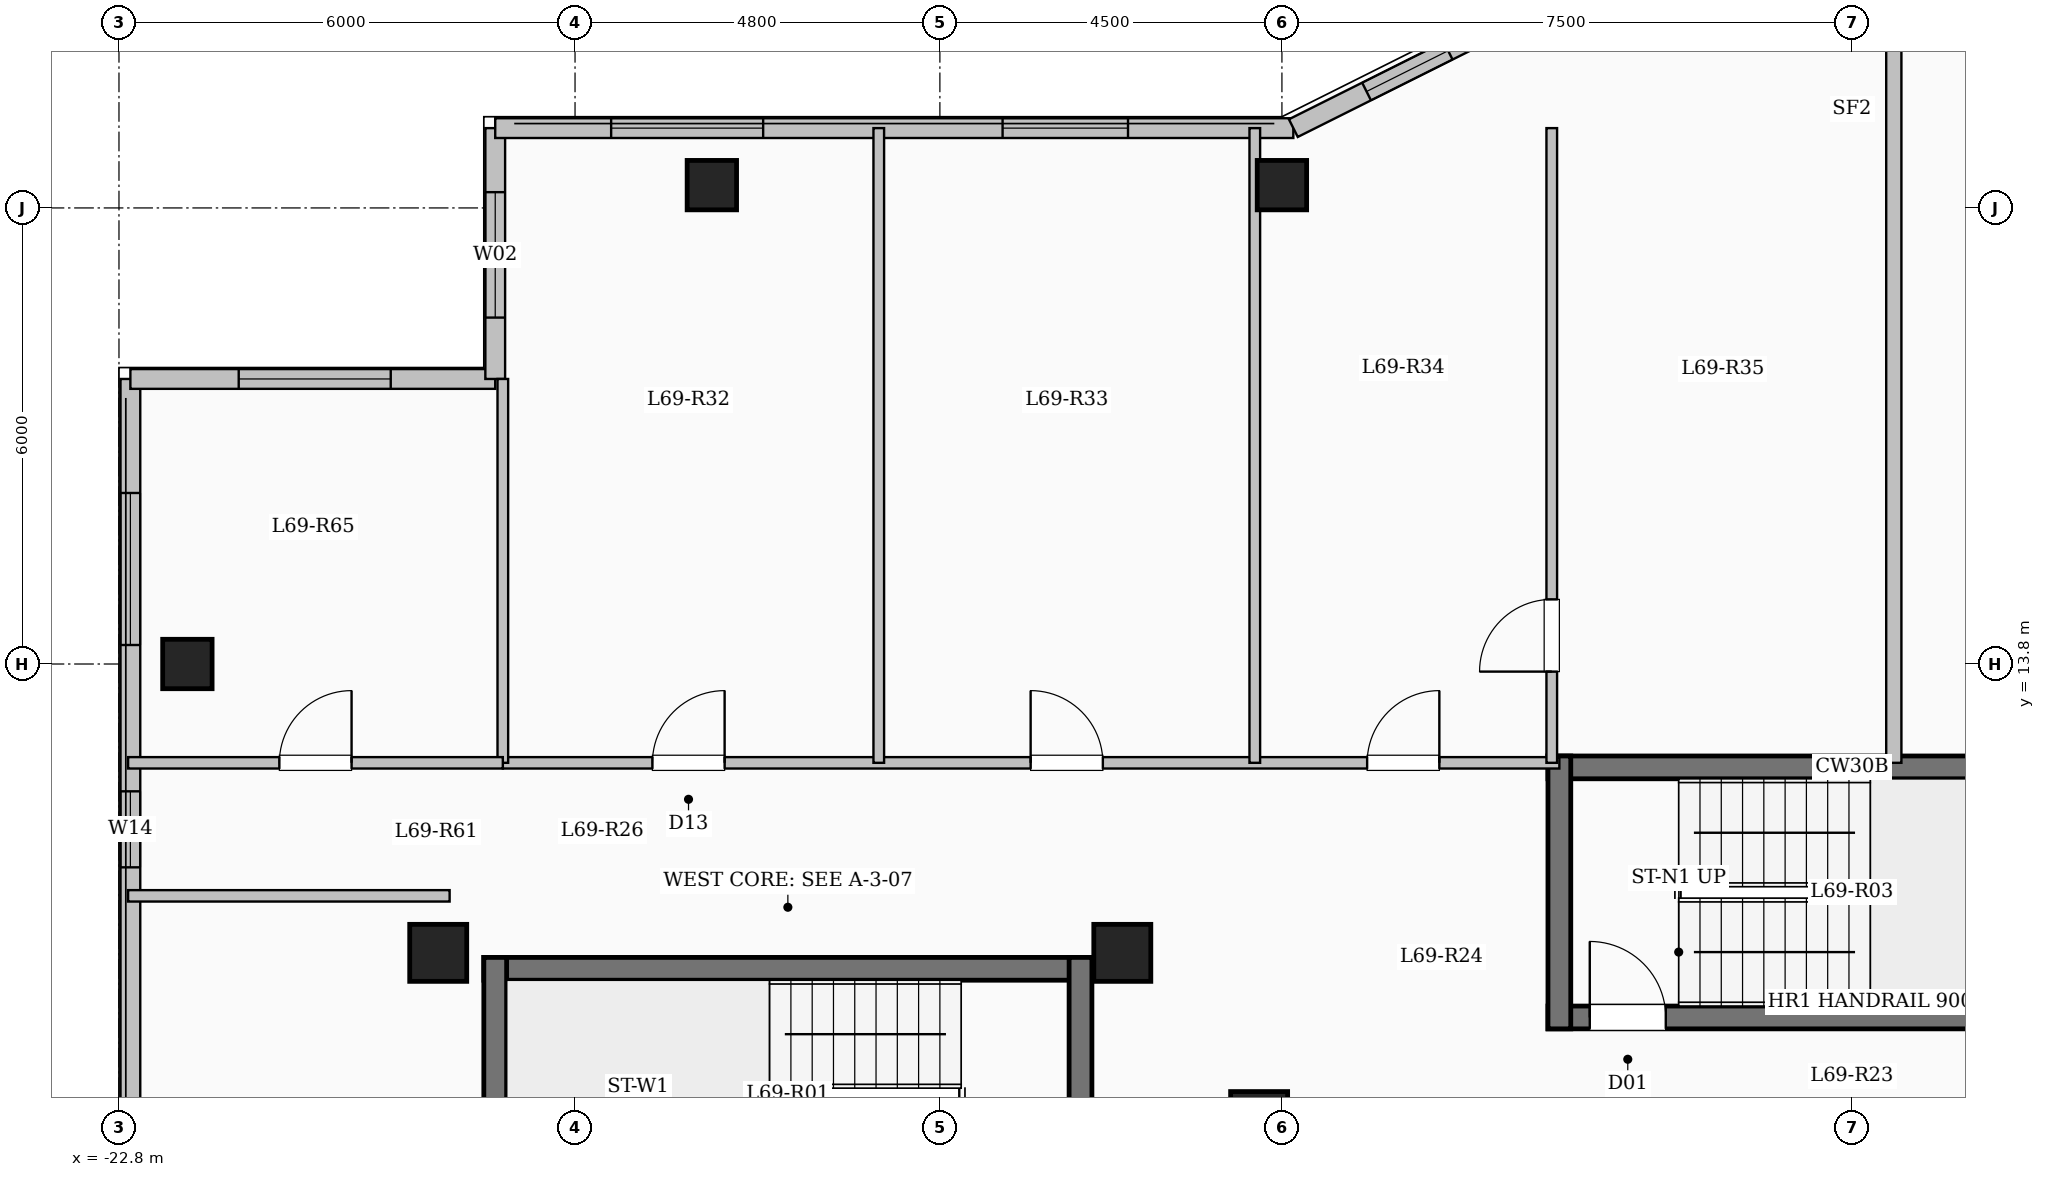
"""IFC4 building model, lengths in metres.
Left out: names, types, materials, properties, quantities, classifications, styles, units other than length and angle.
Written with IfcOpenShell. Run it as: python <this file> out.ifc"""

import sys

from ifc_helpers import new_model, si_unit, direction, frame, frame_2d, origin, origin_2d, place, context, subcontext, project, spatial, rectangle, extrude, element, fill, save


model = new_model("IFC4")
c1 = context("Model", 3, precision=1e-05, world=origin(), true_north=direction((0.0, 1.0)))
c2 = subcontext(c1, "Body", "Model", "MODEL_VIEW")
j1 = project(units=[si_unit("LENGTHUNIT", "METRE"), si_unit("PLANEANGLEUNIT", "RADIAN")], contexts=[c1])
p1 = place(None, origin())
s1 = spatial("IfcSite", under=j1, at=p1, CompositionType="ELEMENT")
p2 = place(p1, origin())
s2 = spatial("IfcBuilding", under=s1, at=p2, CompositionType="ELEMENT")
p3 = place(p2, frame((0.0, 0.0, 254.9)))
s3 = spatial("IfcBuildingStorey", under=s2, at=p3, CompositionType="ELEMENT", Elevation=254.9)
for number, where, z_axis, x_axis in (
    (1, (-7.8, 7.8, 0.0), (0.0, 0.0, 1.0), (1.0, 0.0, 0.0)),
    (2, (-9.6, 10.0, 0.0), (0.0, 0.0, 1.0), (1.0, 0.0, 0.0)),
    (3, (-18.6, 10.0, 0.0), (0.0, 0.0, 1.0), (1.0, 0.0, 0.0)),
):
    element("IfcColumn", number, at=place(p3, frame(where, z_axis=z_axis, x_axis=x_axis)), inside=s3, PredefinedType="COLUMN", context=c2, shape_type="SweptSolid", body=[
        extrude(rectangle(XDim=0.75, YDim=0.75, at=origin_2d()), origin(), (0.0, 0.0, 1.0), 3.35),
    ])
for number, where, z_axis, x_axis in (
    (4, (-15.0, 20.1, 0.0), (0.0, 0.0, 1.0), (1.0, 0.0, 0.0)),
    (5, (-7.5, 20.1, 0.0), (0.0, 0.0, 1.0), (1.0, 0.0, 0.0)),
    (6, (-21.9, 13.8, 0.0), (0.0, 0.0, 1.0), (1.0, 0.0, 0.0)),
):
    element("IfcColumn", number, at=place(p3, frame(where, z_axis=z_axis, x_axis=x_axis)), inside=s3, PredefinedType="COLUMN", context=c2, shape_type="SweptSolid", body=[
        extrude(rectangle(XDim=0.65, YDim=0.65, at=origin_2d()), origin(), (0.0, 0.0, 1.0), 3.35),
    ])
p4 = place(p3, frame((-22.65, -17.55, 0.0), z_axis=(0.0, 0.0, 1.0), x_axis=(0.0, 1.0, 0.0)))
e7 = element("IfcWall", 7, at=p4, inside=s3, PredefinedType="SOLIDWALL", context=c2, shape_type="SweptSolid", body=[
    extrude(rectangle(XDim=35.1, YDim=0.26, at=frame_2d((17.55, 0.0))), origin(), (0.0, 0.0, 1.0), 3.1),
])
p5 = place(p4, frame((2.975, 0.0, 0.9)))
e8 = element("IfcOpeningElement", 8, at=p5, cuts=e7, PredefinedType="OPENING", context=c2, shape_type="SweptSolid", body=[
    extrude(rectangle(XDim=2.2, YDim=1.75, at=frame_2d((1.1, 0.875))), frame((0.0, 0.14, 0.0), z_axis=(0.0, -1.0, 0.0), x_axis=(1.0, 0.0, 0.0)), (0.0, 0.0, 1.0), 0.28),
])
p6 = place(p4, frame((8.625, 0.0, 0.95)))
e9 = element("IfcOpeningElement", 9, at=p6, cuts=e7, PredefinedType="OPENING", context=c2, shape_type="SweptSolid", body=[
    extrude(rectangle(XDim=1.2, YDim=1.5, at=frame_2d((0.6, 0.75))), frame((0.0, 0.14, 0.0), z_axis=(0.0, -1.0, 0.0), x_axis=(1.0, 0.0, 0.0)), (0.0, 0.0, 1.0), 0.28),
])
p7 = place(p4, frame((18.3, 0.0, 0.9)))
e10 = element("IfcOpeningElement", 10, at=p7, cuts=e7, PredefinedType="OPENING", context=c2, shape_type="SweptSolid", body=[
    extrude(rectangle(XDim=2.0, YDim=1.7, at=frame_2d((1.0, 0.85))), frame((0.0, 0.14, 0.0), z_axis=(0.0, -1.0, 0.0), x_axis=(1.0, 0.0, 0.0)), (0.0, 0.0, 1.0), 0.28),
])
p8 = place(p4, frame((28.675, 0.0, 0.95)))
e11 = element("IfcOpeningElement", 11, at=p8, cuts=e7, PredefinedType="OPENING", context=c2, shape_type="SweptSolid", body=[
    extrude(rectangle(XDim=1.0, YDim=1.5, at=frame_2d((0.5, 0.75))), frame((0.0, 0.14, 0.0), z_axis=(0.0, -1.0, 0.0), x_axis=(1.0, 0.0, 0.0)), (0.0, 0.0, 1.0), 0.28),
])
p9 = place(p4, frame((31.6, 0.0, 0.9)))
e12 = element("IfcOpeningElement", 12, at=p9, cuts=e7, PredefinedType="OPENING", context=c2, shape_type="SweptSolid", body=[
    extrude(rectangle(XDim=2.0, YDim=1.7, at=frame_2d((1.0, 0.85))), frame((0.0, 0.14, 0.0), z_axis=(0.0, -1.0, 0.0), x_axis=(1.0, 0.0, 0.0)), (0.0, 0.0, 1.0), 0.28),
])
p10 = place(p3, frame((-22.65, 17.55, 0.0), z_axis=(0.0, 0.0, 1.0), x_axis=(1.0, 0.0, 0.0)))
e13 = element("IfcWall", 13, at=p10, inside=s3, PredefinedType="SOLIDWALL", context=c2, shape_type="SweptSolid", body=[
    extrude(rectangle(XDim=4.8, YDim=0.26, at=frame_2d((2.4, 0.0))), origin(), (0.0, 0.0, 1.0), 3.1),
])
p11 = place(p10, frame((1.425, 0.0, 0.9)))
e14 = element("IfcOpeningElement", 14, at=p11, cuts=e13, PredefinedType="OPENING", context=c2, shape_type="SweptSolid", body=[
    extrude(rectangle(XDim=2.0, YDim=1.7, at=frame_2d((1.0, 0.85))), frame((0.0, 0.14, 0.0), z_axis=(0.0, -1.0, 0.0), x_axis=(1.0, 0.0, 0.0)), (0.0, 0.0, 1.0), 0.28),
])
p12 = place(p3, frame((-17.85, 17.55, 0.0), z_axis=(0.0, 0.0, 1.0), x_axis=(0.0, 1.0, 0.0)))
e15 = element("IfcWall", 15, at=p12, inside=s3, PredefinedType="SOLIDWALL", context=c2, shape_type="SweptSolid", body=[
    extrude(rectangle(XDim=3.3, YDim=0.26, at=frame_2d((1.65, 0.0))), origin(), (0.0, 0.0, 1.0), 3.1),
])
p13 = place(p12, frame((0.808, 0.0, 0.9)))
e16 = element("IfcOpeningElement", 16, at=p13, cuts=e15, PredefinedType="OPENING", context=c2, shape_type="SweptSolid", body=[
    extrude(rectangle(XDim=1.65, YDim=1.6, at=frame_2d((0.825, 0.8))), frame((0.0, 0.14, 0.0), z_axis=(0.0, -1.0, 0.0), x_axis=(1.0, 0.0, 0.0)), (0.0, 0.0, 1.0), 0.28),
])
p14 = place(p3, frame((-17.85, 20.85, 0.0), z_axis=(0.0, 0.0, 1.0), x_axis=(1.0, 0.0, 0.0)))
e17 = element("IfcWall", 17, at=p14, inside=s3, PredefinedType="SOLIDWALL", context=c2, shape_type="SweptSolid", body=[
    extrude(rectangle(XDim=10.5, YDim=0.26, at=frame_2d((5.25, 0.0))), origin(), (0.0, 0.0, 1.0), 3.1),
])
p15 = place(p14, frame((1.525, 0.0, 0.9)))
e18 = element("IfcOpeningElement", 18, at=p15, cuts=e17, PredefinedType="OPENING", context=c2, shape_type="SweptSolid", body=[
    extrude(rectangle(XDim=2.0, YDim=1.7, at=frame_2d((1.0, 0.85))), frame((0.0, 0.14, 0.0), z_axis=(0.0, -1.0, 0.0), x_axis=(1.0, 0.0, 0.0)), (0.0, 0.0, 1.0), 0.28),
])
p16 = place(p14, frame((6.675, 0.0, 0.9)))
e19 = element("IfcOpeningElement", 19, at=p16, cuts=e17, PredefinedType="OPENING", context=c2, shape_type="SweptSolid", body=[
    extrude(rectangle(XDim=1.65, YDim=1.6, at=frame_2d((0.825, 0.8))), frame((0.0, 0.14, 0.0), z_axis=(0.0, -1.0, 0.0), x_axis=(1.0, 0.0, 0.0)), (0.0, 0.0, 1.0), 0.28),
])
p17 = place(p3, frame((-7.35, 20.85, 0.0), z_axis=(0.0, 0.0, 1.0), x_axis=(0.894427191, 0.4472135955, 0.0)))
e20 = element("IfcWall", 20, at=p17, inside=s3, PredefinedType="SOLIDWALL", context=c2, shape_type="SweptSolid", body=[
    extrude(rectangle(XDim=3.354, YDim=0.26, at=frame_2d((1.677, 0.0))), origin(), (0.0, 0.0, 1.0), 3.1),
])
p18 = place(p17, frame((1.077, 0.0, 0.95)))
e21 = element("IfcOpeningElement", 21, at=p18, cuts=e20, PredefinedType="OPENING", context=c2, shape_type="SweptSolid", body=[
    extrude(rectangle(XDim=1.2, YDim=1.5, at=frame_2d((0.6, 0.75))), frame((0.0, 0.14, 0.0), z_axis=(0.0, -1.0, 0.0), x_axis=(1.0, 0.0, 0.0)), (0.0, 0.0, 1.0), 0.28),
])
p19 = place(p3, frame((-18.0, 9.79, 0.0), z_axis=(0.0, 0.0, 1.0), x_axis=(1.0, 0.0, 0.0)))
e22 = element("IfcWall", 22, at=p19, inside=s3, PredefinedType="SHEAR", context=c2, shape_type="SweptSolid", body=[
    extrude(rectangle(XDim=8.0, YDim=0.3, at=frame_2d((4.0, 0.0))), origin(), (0.0, 0.0, 1.0), 3.35),
])
for number, where, z_axis, x_axis in (
    (23, (-17.85, 6.35, 0.0), (0.0, 0.0, 1.0), (0.0, 1.0, 0.0)),
    (24, (-10.15, 6.35, 0.0), (0.0, 0.0, 1.0), (0.0, 1.0, 0.0)),
):
    element("IfcWall", number, at=place(p3, frame(where, z_axis=z_axis, x_axis=x_axis)), inside=s3, PredefinedType="SHEAR", context=c2, shape_type="SweptSolid", body=[
        extrude(rectangle(XDim=3.59, YDim=0.3, at=frame_2d((1.795, 0.0))), origin(), (0.0, 0.0, 1.0), 3.35),
    ])
p20 = place(p3, frame((-4.0, 12.44, 0.0), z_axis=(0.0, 0.0, 1.0), x_axis=(1.0, 0.0, 0.0)))
e25 = element("IfcWall", 25, at=p20, inside=s3, PredefinedType="SHEAR", context=c2, shape_type="SweptSolid", body=[
    extrude(rectangle(XDim=8.0, YDim=0.3, at=frame_2d((4.0, 0.0))), origin(), (0.0, 0.0, 1.0), 3.35),
])
p21 = place(p3, frame((-4.0, 9.15, 0.0), z_axis=(0.0, 0.0, 1.0), x_axis=(1.0, 0.0, 0.0)))
e26 = element("IfcWall", 26, at=p21, inside=s3, PredefinedType="SHEAR", context=c2, shape_type="SweptSolid", body=[
    extrude(rectangle(XDim=8.0, YDim=0.3, at=frame_2d((4.0, 0.0))), origin(), (0.0, 0.0, 1.0), 3.35),
])
p22 = place(p21, frame((0.55, 0.0, 0.0)))
e27 = element("IfcOpeningElement", 27, at=p22, cuts=e26, PredefinedType="OPENING", context=c2, shape_type="SweptSolid", body=[
    extrude(rectangle(XDim=1.0, YDim=2.15, at=frame_2d((0.5, 1.075))), frame((0.0, 0.16, 0.0), z_axis=(0.0, -1.0, 0.0), x_axis=(1.0, 0.0, 0.0)), (0.0, 0.0, 1.0), 0.32),
])
p23 = place(p3, frame((-3.85, 9.0, 0.0), z_axis=(0.0, 0.0, 1.0), x_axis=(0.0, 1.0, 0.0)))
e28 = element("IfcWall", 28, at=p23, inside=s3, PredefinedType="SHEAR", context=c2, shape_type="SweptSolid", body=[
    extrude(rectangle(XDim=3.59, YDim=0.3, at=frame_2d((1.795, 0.0))), origin(), (0.0, 0.0, 1.0), 3.35),
])
p24 = place(p3, frame((-17.75, 12.5, 0.0), z_axis=(0.0, 0.0, 1.0), x_axis=(1.0, 0.0, 0.0)))
e29 = element("IfcWall", 29, at=p24, inside=s3, PredefinedType="PARTITIONING", context=c2, shape_type="SweptSolid", body=[
    extrude(rectangle(XDim=13.9, YDim=0.15, at=frame_2d((6.95, 0.0))), origin(), (0.0, 0.0, 1.0), 3.1),
])
p25 = place(p24, frame((1.968, 0.0, 0.0)))
e30 = element("IfcOpeningElement", 30, at=p25, cuts=e29, PredefinedType="OPENING", context=c2, shape_type="SweptSolid", body=[
    extrude(rectangle(XDim=0.95, YDim=2.15, at=frame_2d((0.475, 1.075))), frame((0.0, 0.085, 0.0), z_axis=(0.0, -1.0, 0.0), x_axis=(1.0, 0.0, 0.0)), (0.0, 0.0, 1.0), 0.17),
])
p26 = place(p24, frame((6.944, 0.0, 0.0)))
e31 = element("IfcOpeningElement", 31, at=p26, cuts=e29, PredefinedType="OPENING", context=c2, shape_type="SweptSolid", body=[
    extrude(rectangle(XDim=0.95, YDim=2.15, at=frame_2d((0.475, 1.075))), frame((0.0, 0.085, 0.0), z_axis=(0.0, -1.0, 0.0), x_axis=(1.0, 0.0, 0.0)), (0.0, 0.0, 1.0), 0.17),
])
p27 = place(p24, frame((11.371, 0.0, 0.0)))
e32 = element("IfcOpeningElement", 32, at=p27, cuts=e29, PredefinedType="OPENING", context=c2, shape_type="SweptSolid", body=[
    extrude(rectangle(XDim=0.95, YDim=2.15, at=frame_2d((0.475, 1.075))), frame((0.0, 0.085, 0.0), z_axis=(0.0, -1.0, 0.0), x_axis=(1.0, 0.0, 0.0)), (0.0, 0.0, 1.0), 0.17),
])
p28 = place(p3, frame((0.55, 12.5, 0.0), z_axis=(0.0, 0.0, 1.0), x_axis=(0.0, 1.0, 0.0)))
e33 = element("IfcWall", 33, at=p28, inside=s3, PredefinedType="SOLIDWALL", context=c2, shape_type="SweptSolid", body=[
    extrude(rectangle(XDim=9.88, YDim=0.2, at=frame_2d((4.94, 0.0))), origin(), (0.0, 0.0, 1.0), 3.1),
])
p29 = place(p3, frame((-3.95, 12.5, 0.0), z_axis=(0.0, 0.0, 1.0), x_axis=(0.0, 1.0, 0.0)))
e34 = element("IfcWall", 34, at=p29, inside=s3, PredefinedType="PARTITIONING", context=c2, shape_type="SweptSolid", body=[
    extrude(rectangle(XDim=8.35, YDim=0.14, at=frame_2d((4.175, 0.0))), origin(), (0.0, 0.0, 1.0), 3.1),
])
p30 = place(p29, frame((1.2, 0.0, 0.0)))
e35 = element("IfcOpeningElement", 35, at=p30, cuts=e34, PredefinedType="OPENING", context=c2, shape_type="SweptSolid", body=[
    extrude(rectangle(XDim=0.95, YDim=2.15, at=frame_2d((0.475, 1.075))), frame((0.0, 0.08, 0.0), z_axis=(0.0, -1.0, 0.0), x_axis=(1.0, 0.0, 0.0)), (0.0, 0.0, 1.0), 0.16),
])
p31 = place(p3, frame((-12.804, 12.5, 0.0), z_axis=(0.0, 0.0, 1.0), x_axis=(0.0, 1.0, 0.0)))
e36 = element("IfcWall", 36, at=p31, inside=s3, PredefinedType="PARTITIONING", context=c2, shape_type="SweptSolid", body=[
    extrude(rectangle(XDim=8.35, YDim=0.14, at=frame_2d((4.175, 0.0))), origin(), (0.0, 0.0, 1.0), 3.1),
])
p32 = place(p3, frame((-7.857, 12.5, 0.0), z_axis=(0.0, 0.0, 1.0), x_axis=(0.0, 1.0, 0.0)))
e37 = element("IfcWall", 37, at=p32, inside=s3, PredefinedType="PARTITIONING", context=c2, shape_type="SweptSolid", body=[
    extrude(rectangle(XDim=8.35, YDim=0.14, at=frame_2d((4.175, 0.0))), origin(), (0.0, 0.0, 1.0), 2.685),
])
p33 = place(p3, frame((-22.68, 10.75, 0.0), z_axis=(0.0, 0.0, 1.0), x_axis=(1.0, 0.0, 0.0)))
e38 = element("IfcWall", 38, at=p33, inside=s3, PredefinedType="PARTITIONING", context=c2, shape_type="SweptSolid", body=[
    extrude(rectangle(XDim=4.23, YDim=0.15, at=frame_2d((2.115, 0.0))), origin(), (0.0, 0.0, 1.0), 3.1),
])
p34 = place(p3, frame((-17.75, 12.5, 0.0), z_axis=(0.0, 0.0, 1.0), x_axis=(0.0, 1.0, 0.0)))
e39 = element("IfcWall", 39, at=p34, inside=s3, PredefinedType="PARTITIONING", context=c2, shape_type="SweptSolid", body=[
    extrude(rectangle(XDim=5.05, YDim=0.14, at=frame_2d((2.525, 0.0))), origin(), (0.0, 0.0, 1.0), 3.1),
])
p35 = place(p3, frame((-22.68, 12.5, 0.0), z_axis=(0.0, 0.0, 1.0), x_axis=(1.0, 0.0, 0.0)))
e40 = element("IfcWall", 40, at=p35, inside=s3, PredefinedType="PARTITIONING", context=c2, shape_type="SweptSolid", body=[
    extrude(rectangle(XDim=4.93, YDim=0.15, at=frame_2d((2.465, 0.0))), origin(), (0.0, 0.0, 1.0), 3.1),
])
p36 = place(p35, frame((1.99, 0.0, 0.0)))
e41 = element("IfcOpeningElement", 41, at=p36, cuts=e40, PredefinedType="OPENING", context=c2, shape_type="SweptSolid", body=[
    extrude(rectangle(XDim=0.95, YDim=2.15, at=frame_2d((0.475, 1.075))), frame((0.0, 0.085, 0.0), z_axis=(0.0, -1.0, 0.0), x_axis=(1.0, 0.0, 0.0)), (0.0, 0.0, 1.0), 0.17),
])
p37 = place(p8, origin())
e42 = element("IfcWindow", 42, at=p37, inside=s3, PartitioningType="SINGLE_PANEL", PredefinedType="WINDOW", context=c2, shape_type="SweptSolid", body=[
    extrude(rectangle(XDim=1.0, YDim=1.5, at=frame_2d((0.5, 0.75))), frame((0.0, 0.03, 0.0), z_axis=(0.0, -1.0, 0.0), x_axis=(1.0, 0.0, 0.0)), (0.0, 0.0, 1.0), 0.06),
])
fill(e11, e42)
p38 = place(p9, origin())
e43 = element("IfcWindow", 43, at=p38, inside=s3, PartitioningType="SINGLE_PANEL", PredefinedType="WINDOW", context=c2, shape_type="SweptSolid", body=[
    extrude(rectangle(XDim=2.0, YDim=1.7, at=frame_2d((1.0, 0.85))), frame((0.0, 0.03, 0.0), z_axis=(0.0, -1.0, 0.0), x_axis=(1.0, 0.0, 0.0)), (0.0, 0.0, 1.0), 0.06),
])
fill(e12, e43)
p39 = place(p11, origin())
e44 = element("IfcWindow", 44, at=p39, inside=s3, PartitioningType="SINGLE_PANEL", PredefinedType="WINDOW", context=c2, shape_type="SweptSolid", body=[
    extrude(rectangle(XDim=2.0, YDim=1.7, at=frame_2d((1.0, 0.85))), frame((0.0, 0.03, 0.0), z_axis=(0.0, -1.0, 0.0), x_axis=(1.0, 0.0, 0.0)), (0.0, 0.0, 1.0), 0.06),
])
fill(e14, e44)
p40 = place(p13, origin())
e45 = element("IfcWindow", 45, at=p40, inside=s3, PartitioningType="SINGLE_PANEL", PredefinedType="WINDOW", context=c2, shape_type="SweptSolid", body=[
    extrude(rectangle(XDim=1.65, YDim=1.6, at=frame_2d((0.825, 0.8))), frame((0.0, 0.03, 0.0), z_axis=(0.0, -1.0, 0.0), x_axis=(1.0, 0.0, 0.0)), (0.0, 0.0, 1.0), 0.06),
])
fill(e16, e45)
p41 = place(p15, origin())
e46 = element("IfcWindow", 46, at=p41, inside=s3, PartitioningType="SINGLE_PANEL", PredefinedType="WINDOW", context=c2, shape_type="SweptSolid", body=[
    extrude(rectangle(XDim=2.0, YDim=1.7, at=frame_2d((1.0, 0.85))), frame((0.0, 0.03, 0.0), z_axis=(0.0, -1.0, 0.0), x_axis=(1.0, 0.0, 0.0)), (0.0, 0.0, 1.0), 0.06),
])
fill(e18, e46)
p42 = place(p16, origin())
e47 = element("IfcWindow", 47, at=p42, inside=s3, PartitioningType="SINGLE_PANEL", PredefinedType="WINDOW", context=c2, shape_type="SweptSolid", body=[
    extrude(rectangle(XDim=1.65, YDim=1.6, at=frame_2d((0.825, 0.8))), frame((0.0, 0.03, 0.0), z_axis=(0.0, -1.0, 0.0), x_axis=(1.0, 0.0, 0.0)), (0.0, 0.0, 1.0), 0.06),
])
fill(e19, e47)
p43 = place(p18, origin())
e48 = element("IfcWindow", 48, at=p43, inside=s3, PartitioningType="SINGLE_PANEL", PredefinedType="WINDOW", context=c2, shape_type="SweptSolid", body=[
    extrude(rectangle(XDim=1.2, YDim=1.5, at=frame_2d((0.6, 0.75))), frame((0.0, 0.03, 0.0), z_axis=(0.0, -1.0, 0.0), x_axis=(1.0, 0.0, 0.0)), (0.0, 0.0, 1.0), 0.06),
])
fill(e21, e48)
p44 = place(p22, origin())
e49 = element("IfcDoor", 49, at=p44, inside=s3, OperationType="SINGLE_SWING_LEFT", PredefinedType="DOOR", context=c2, shape_type="SweptSolid", body=[
    extrude(rectangle(XDim=1.0, YDim=2.15, at=frame_2d((0.5, 1.075))), frame((0.0, 0.025, 0.0), z_axis=(0.0, -1.0, 0.0), x_axis=(1.0, 0.0, 0.0)), (0.0, 0.0, 1.0), 0.05),
])
fill(e27, e49)
p45 = place(p25, origin())
e50 = element("IfcDoor", 50, at=p45, inside=s3, OperationType="SINGLE_SWING_RIGHT", PredefinedType="DOOR", context=c2, shape_type="SweptSolid", body=[
    extrude(rectangle(XDim=0.95, YDim=2.15, at=frame_2d((0.475, 1.075))), frame((0.0, 0.025, 0.0), z_axis=(0.0, -1.0, 0.0), x_axis=(1.0, 0.0, 0.0)), (0.0, 0.0, 1.0), 0.05),
])
fill(e30, e50)
p46 = place(p26, origin())
e51 = element("IfcDoor", 51, at=p46, inside=s3, OperationType="SINGLE_SWING_LEFT", PredefinedType="DOOR", context=c2, shape_type="SweptSolid", body=[
    extrude(rectangle(XDim=0.95, YDim=2.15, at=frame_2d((0.475, 1.075))), frame((0.0, 0.025, 0.0), z_axis=(0.0, -1.0, 0.0), x_axis=(1.0, 0.0, 0.0)), (0.0, 0.0, 1.0), 0.05),
])
fill(e31, e51)
p47 = place(p27, origin())
e52 = element("IfcDoor", 52, at=p47, inside=s3, OperationType="SINGLE_SWING_RIGHT", PredefinedType="DOOR", context=c2, shape_type="SweptSolid", body=[
    extrude(rectangle(XDim=0.95, YDim=2.15, at=frame_2d((0.475, 1.075))), frame((0.0, 0.025, 0.0), z_axis=(0.0, -1.0, 0.0), x_axis=(1.0, 0.0, 0.0)), (0.0, 0.0, 1.0), 0.05),
])
fill(e32, e52)
p48 = place(p30, origin())
e53 = element("IfcDoor", 53, at=p48, inside=s3, OperationType="SINGLE_SWING_LEFT", PredefinedType="DOOR", context=c2, shape_type="SweptSolid", body=[
    extrude(rectangle(XDim=0.95, YDim=2.15, at=frame_2d((0.475, 1.075))), frame((0.0, 0.025, 0.0), z_axis=(0.0, -1.0, 0.0), x_axis=(1.0, 0.0, 0.0)), (0.0, 0.0, 1.0), 0.05),
])
fill(e35, e53)
p49 = place(p36, origin())
e54 = element("IfcDoor", 54, at=p49, inside=s3, OperationType="SINGLE_SWING_RIGHT", PredefinedType="DOOR", context=c2, shape_type="SweptSolid", body=[
    extrude(rectangle(XDim=0.95, YDim=2.15, at=frame_2d((0.475, 1.075))), frame((0.0, 0.025, 0.0), z_axis=(0.0, -1.0, 0.0), x_axis=(1.0, 0.0, 0.0)), (0.0, 0.0, 1.0), 0.05),
])
fill(e41, e54)
save(model, sys.argv[1])
